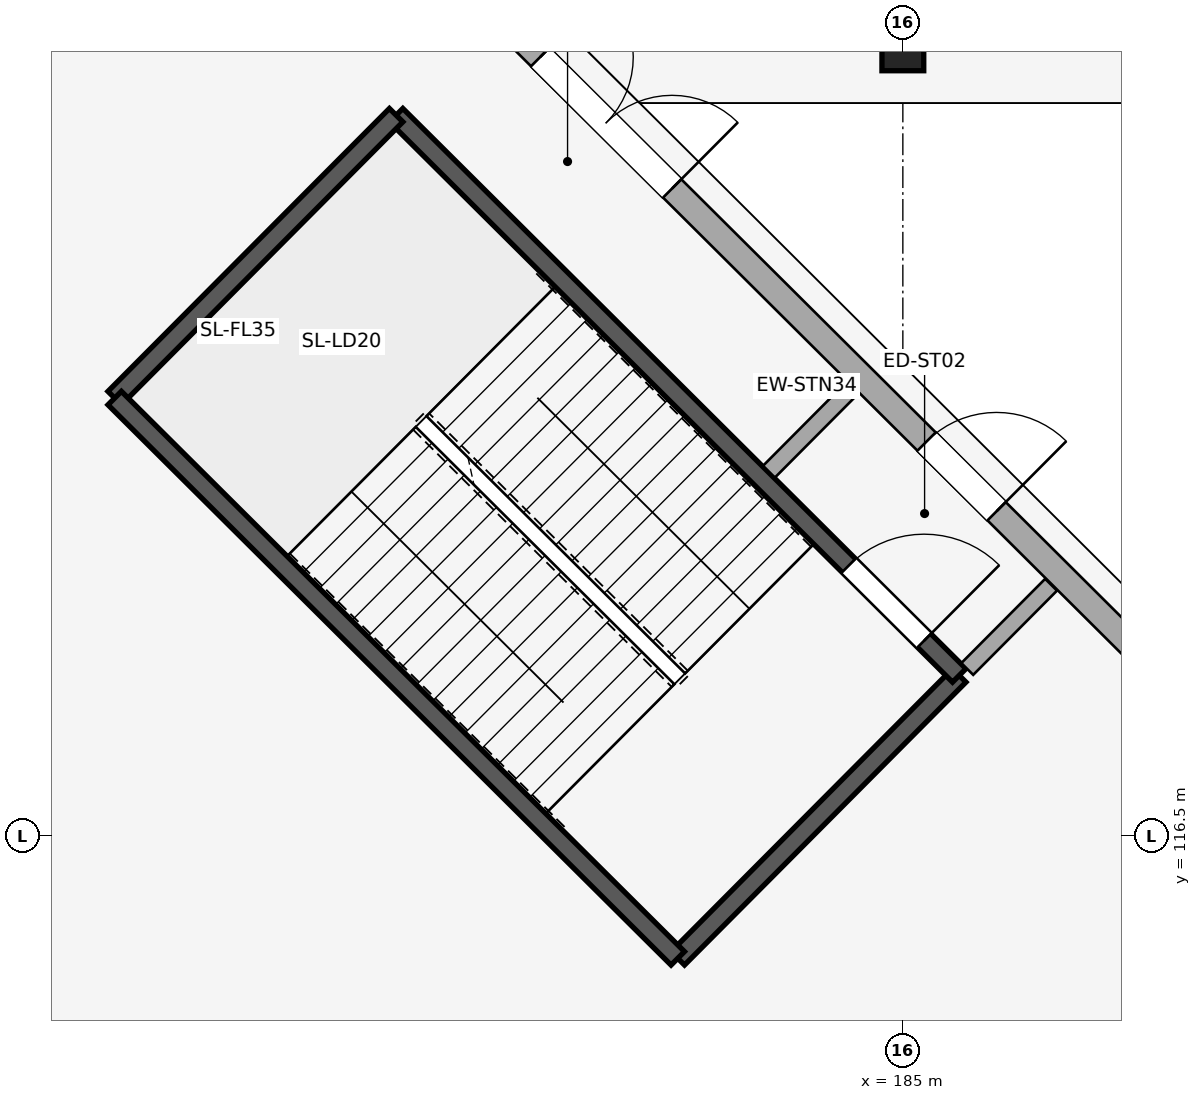
"""IFC4 building model, lengths in metres.
Left out: names, types, materials, properties, quantities, classifications, styles, units other than length and angle.
Written with IfcOpenShell. Run it as: python <this file> out.ifc"""

import sys

from ifc_helpers import new_model, si_unit, direction, frame, frame_2d, origin, origin_2d, place, context, subcontext, project, spatial, rectangle, extrude, element, fill, save


model = new_model("IFC4")
c1 = context("Model", 3, precision=1e-05, world=origin(), true_north=direction((0.0, 1.0)))
c2 = subcontext(c1, "Body", "Model", "MODEL_VIEW")
j1 = project(units=[si_unit("LENGTHUNIT", "METRE"), si_unit("PLANEANGLEUNIT", "RADIAN")], contexts=[c1])
p1 = place(None, origin())
s1 = spatial("IfcSite", under=j1, at=p1, CompositionType="ELEMENT")
p2 = place(p1, origin())
s2 = spatial("IfcBuilding", under=s1, at=p2, CompositionType="ELEMENT")
p3 = place(p2, origin())
s3 = spatial("IfcBuildingStorey", under=s2, at=p3, CompositionType="ELEMENT", Elevation=0.0)
p4 = place(p3, frame((185.0, 127.0, 0.0), z_axis=(0.0, 0.0, 1.0), x_axis=(1.0, 0.0, 0.0)))
e1 = element("IfcColumn", 1, at=p4, inside=s3, PredefinedType="PILASTER", context=c2, shape_type="SweptSolid", body=[
    extrude(rectangle(XDim=0.55, YDim=0.85, at=origin_2d()), origin(), (0.0, 0.0, 1.0), 5.4),
])
p5 = place(p3, frame((191.214, 115.824, 0.0), z_axis=(0.0, 0.0, 1.0), x_axis=(-0.708905356977, 0.705303618911, 0.0)))
e2 = element("IfcWall", 2, at=p5, inside=s3, PredefinedType="STANDARD", context=c2, shape_type="SweptSolid", body=[
    extrude(rectangle(XDim=19.928, YDim=0.34, at=frame_2d((9.964, 0.0))), origin(), (0.0, 0.0, 1.0), 3.85),
])
p6 = place(p5, frame((7.026, 0.0, 0.0)))
e3 = element("IfcOpeningElement", 3, at=p6, cuts=e2, PredefinedType="OPENING", context=c2, shape_type="SweptSolid", body=[
    extrude(rectangle(XDim=1.3, YDim=2.2, at=frame_2d((0.65, 1.1))), frame((0.0, 0.18, 0.0), z_axis=(0.0, -1.0, 0.0), x_axis=(1.0, 0.0, 0.0)), (0.0, 0.0, 1.0), 0.36),
])
p7 = place(p5, frame((13.047, 0.0, 0.0)))
e4 = element("IfcOpeningElement", 4, at=p7, cuts=e2, PredefinedType="OPENING", context=c2, shape_type="SweptSolid", body=[
    extrude(rectangle(XDim=2.45, YDim=2.4, at=frame_2d((1.225, 1.2))), frame((0.0, 0.18, 0.0), z_axis=(0.0, -1.0, 0.0), x_axis=(1.0, 0.0, 0.0)), (0.0, 0.0, 1.0), 0.36),
])
p8 = place(p3, frame((182.039, 114.898, 0.0), z_axis=(0.0, 0.0, 1.0), x_axis=(0.705314141126, 0.708894888067, 0.0)))
e5 = element("IfcWall", 5, at=p8, inside=s3, PredefinedType="SHEAR", context=c2, shape_type="SweptSolid", body=[
    extrude(rectangle(XDim=5.25, YDim=0.25, at=frame_2d((2.625, 0.0))), origin(), (0.0, 0.0, 1.0), 5.1),
])
p9 = place(p3, frame((185.742, 118.62, 0.0), z_axis=(0.0, 0.0, 1.0), x_axis=(-0.708891762409, 0.705317282639, 0.0)))
e6 = element("IfcWall", 6, at=p9, inside=s3, PredefinedType="SHEAR", context=c2, shape_type="SweptSolid", body=[
    extrude(rectangle(XDim=10.45, YDim=0.25, at=frame_2d((5.225, 0.0))), origin(), (0.0, 0.0, 1.0), 5.1),
])
p10 = place(p9, frame((0.65, 0.0, 0.0)))
e7 = element("IfcOpeningElement", 7, at=p10, cuts=e6, PredefinedType="OPENING", context=c2, shape_type="SweptSolid", body=[
    extrude(rectangle(XDim=1.4, YDim=2.2, at=frame_2d((0.7, 1.1))), frame((0.0, 0.135, 0.0), z_axis=(0.0, -1.0, 0.0), x_axis=(1.0, 0.0, 0.0)), (0.0, 0.0, 1.0), 0.27),
])
p11 = place(p3, frame((178.334, 125.99, 0.0), z_axis=(0.0, 0.0, 1.0), x_axis=(-0.705314141126, -0.708894888067, 0.0)))
e8 = element("IfcWall", 8, at=p11, inside=s3, PredefinedType="SHEAR", context=c2, shape_type="SweptSolid", body=[
    extrude(rectangle(XDim=5.25, YDim=0.25, at=frame_2d((2.625, 0.0))), origin(), (0.0, 0.0, 1.0), 5.1),
])
p12 = place(p3, frame((174.631, 122.269, 0.0), z_axis=(0.0, 0.0, 1.0), x_axis=(0.708891762409, -0.705317282639, 0.0)))
e9 = element("IfcWall", 9, at=p12, inside=s3, PredefinedType="SHEAR", context=c2, shape_type="SweptSolid", body=[
    extrude(rectangle(XDim=10.45, YDim=0.25, at=frame_2d((5.225, 0.0))), origin(), (0.0, 0.0, 1.0), 5.1),
])
p13 = place(p3, frame((185.848, 118.705, 0.0), z_axis=(0.0, 0.0, 1.0), x_axis=(0.705308431296, 0.70890056901, 0.0)))
e10 = element("IfcWall", 10, at=p13, inside=s3, PredefinedType="PARTITIONING", context=c2, shape_type="SweptSolid", body=[
    extrude(rectangle(XDim=1.563, YDim=0.22, at=frame_2d((0.782, 0.0))), origin(), (0.0, 0.0, 1.0), 3.69),
])
p14 = place(p3, frame((183.239, 121.3, 0.0), z_axis=(0.0, 0.0, 1.0), x_axis=(0.70523034672, 0.70897824936, 0.0)))
e11 = element("IfcWall", 11, at=p14, inside=s3, PredefinedType="PARTITIONING", context=c2, shape_type="SweptSolid", body=[
    extrude(rectangle(XDim=1.563, YDim=0.22, at=frame_2d((0.782, 0.0))), origin(), (0.0, 0.0, 1.0), 3.69),
])
p15 = place(p3, frame((176.631, 109.966, 0.0), z_axis=(0.0, 0.0, 1.0), x_axis=(-0.729511725948, 0.683968304605, 0.0)))
e12 = element("IfcWall", 12, at=p15, inside=s3, PredefinedType="MOVABLE", context=c2, shape_type="SweptSolid", body=[
    extrude(rectangle(XDim=17.631, YDim=0.095, at=frame_2d((8.815, 0.0))), origin(), (0.0, 0.0, 1.0), 3.69),
])
p16 = place(p6, frame((1.3, 0.0, 0.0), z_axis=(0.0, 0.0, 1.0), x_axis=(-1.0, 0.0, 0.0)))
e13 = element("IfcDoor", 13, at=p16, inside=s3, OperationType="SINGLE_SWING_RIGHT", PredefinedType="DOOR", context=c2, shape_type="SweptSolid", body=[
    extrude(rectangle(XDim=1.3, YDim=2.2, at=frame_2d((0.65, 1.1))), frame((0.0, 0.025, 0.0), z_axis=(0.0, -1.0, 0.0), x_axis=(1.0, 0.0, 0.0)), (0.0, 0.0, 1.0), 0.05),
])
fill(e3, e13)
p17 = place(p7, frame((2.45, 0.0, 0.0), z_axis=(0.0, 0.0, 1.0), x_axis=(-1.0, 0.0, 0.0)))
e14 = element("IfcDoor", 14, at=p17, inside=s3, OperationType="DOUBLE_DOOR_SINGLE_SWING", PredefinedType="DOOR", context=c2, shape_type="SweptSolid", body=[
    extrude(rectangle(XDim=2.45, YDim=2.4, at=frame_2d((1.225, 1.2))), frame((0.0, 0.025, 0.0), z_axis=(0.0, -1.0, 0.0), x_axis=(1.0, 0.0, 0.0)), (0.0, 0.0, 1.0), 0.05),
])
fill(e4, e14)
p18 = place(p10, frame((1.4, 0.0, 0.0), z_axis=(0.0, 0.0, 1.0), x_axis=(-1.0, 0.0, 0.0)))
e15 = element("IfcDoor", 15, at=p18, inside=s3, OperationType="SINGLE_SWING_RIGHT", PredefinedType="DOOR", context=c2, shape_type="SweptSolid", body=[
    extrude(rectangle(XDim=1.4, YDim=2.2, at=frame_2d((0.7, 1.1))), frame((0.0, 0.025, 0.0), z_axis=(0.0, -1.0, 0.0), x_axis=(1.0, 0.0, 0.0)), (0.0, 0.0, 1.0), 0.05),
])
fill(e7, e15)
save(model, sys.argv[1])
